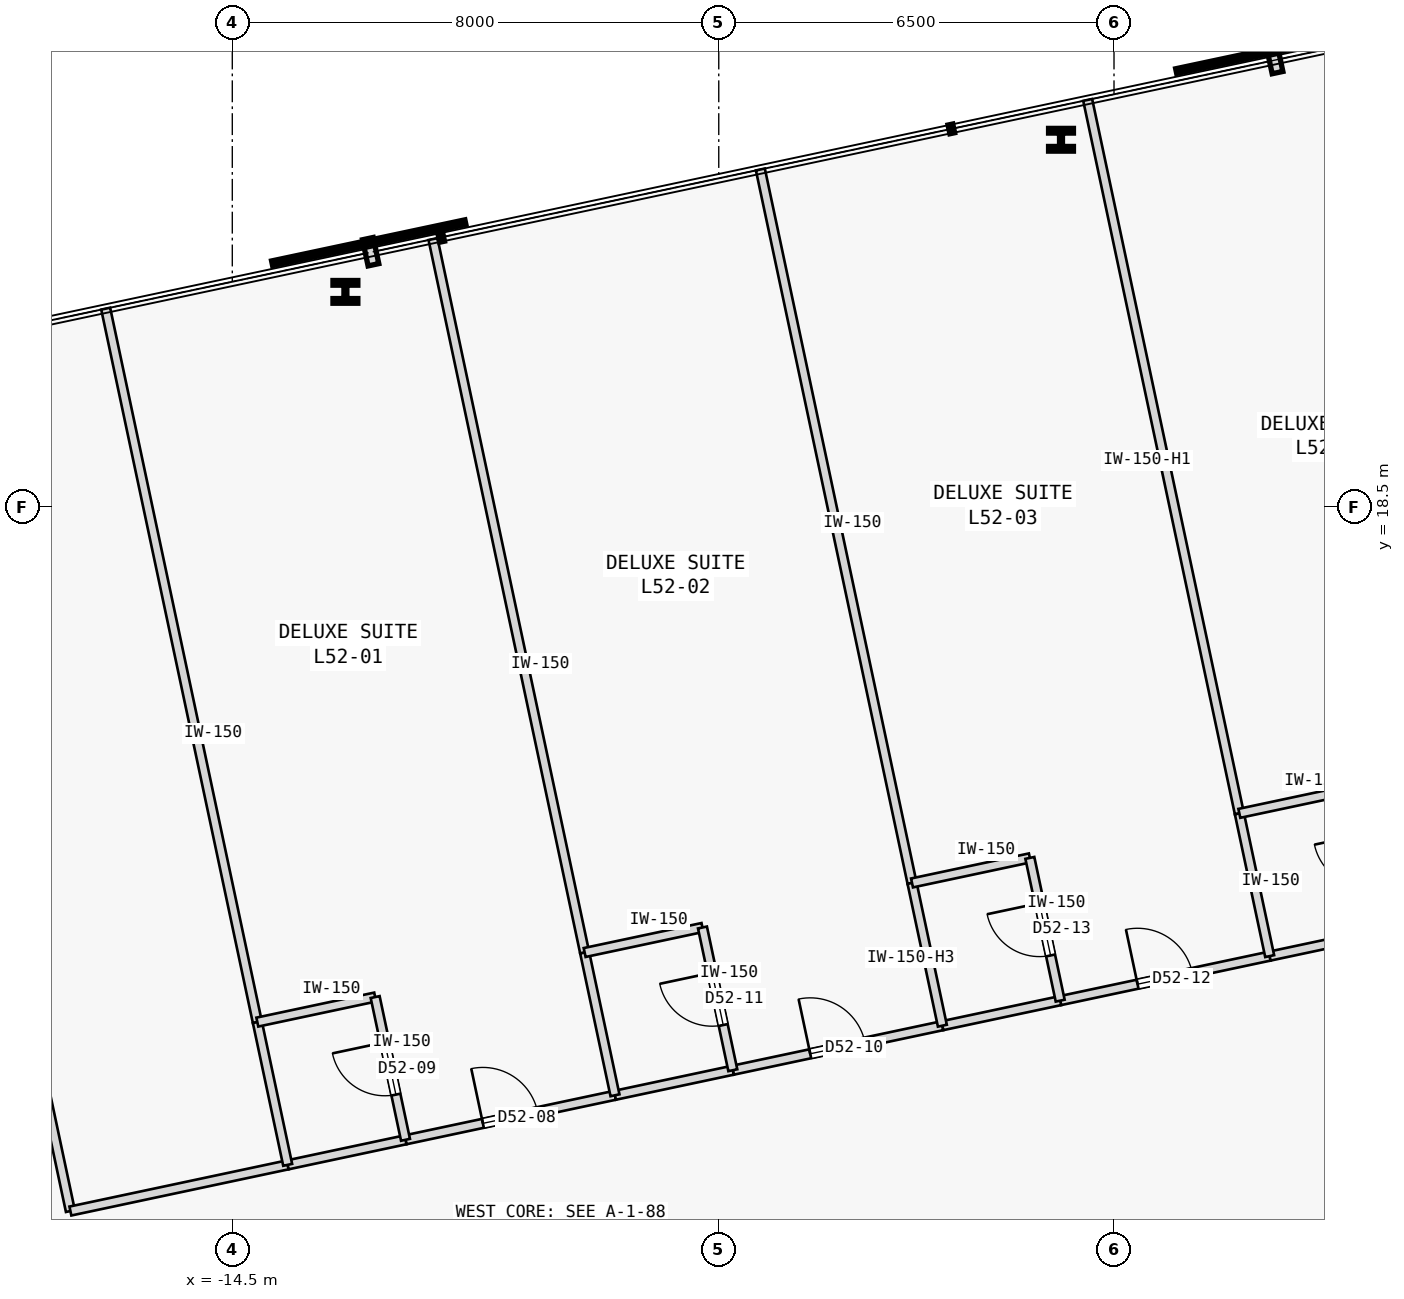
"""IFC4 building model, lengths in metres.
Left out: names, types, materials, properties, quantities, classifications, styles, units other than length and angle.
Written with IfcOpenShell. Run it as: python <this file> out.ifc"""

import sys

from ifc_helpers import new_model, si_unit, direction, frame, frame_2d, origin, origin_2d, place, context, subcontext, project, spatial, rectangle, i_section, extrude, element, fill, save


model = new_model("IFC4")
c1 = context("Model", 3, precision=1e-05, world=origin(), true_north=direction((0.0, 1.0)))
c2 = subcontext(c1, "Body", "Model", "MODEL_VIEW")
j1 = project(units=[si_unit("LENGTHUNIT", "METRE"), si_unit("PLANEANGLEUNIT", "RADIAN")], contexts=[c1])
p1 = place(None, origin())
s1 = spatial("IfcSite", under=j1, at=p1, CompositionType="ELEMENT")
p2 = place(p1, origin())
s2 = spatial("IfcBuilding", under=s1, at=p2, CompositionType="ELEMENT")
p3 = place(p2, frame((0.0, 0.0, 199.0)))
s3 = spatial("IfcBuildingStorey", under=s2, at=p3, CompositionType="ELEMENT", Elevation=199.0)
for number, where, z_axis, x_axis in (
    (1, (-0.872, 24.543, 0.0), (0.0, 0.0, 1.0), (1.0, 0.0, 0.0)),
    (2, (-12.64, 22.042, 0.0), (0.0, 0.0, 1.0), (1.0, 0.0, 0.0)),
):
    element("IfcColumn", number, at=place(p3, frame(where, z_axis=z_axis, x_axis=x_axis)), inside=s3, PredefinedType="COLUMN", context=c2, shape_type="SweptSolid", body=[
        extrude(i_section(OverallWidth=0.409, OverallDepth=0.374, WebThickness=0.048, FlangeThickness=0.077, FilletRadius=0.015, at=origin_2d()), origin(), (0.0, 0.0, 1.0), 3.4),
    ])
p4 = place(p3, frame((-17.162, 6.926, 0.0), z_axis=(0.0, 0.0, 1.0), x_axis=(-0.207911421929, 0.978147657888, 0.0)))
e3 = element("IfcWall", 3, at=p4, inside=s3, PredefinedType="PARTITIONING", context=c2, shape_type="SweptSolid", body=[
    extrude(rectangle(XDim=13.195, YDim=0.15, at=frame_2d((6.598, 0.0))), origin(), (0.0, 0.0, 1.0), 3.0),
])
p5 = place(p4, frame((6.137, 0.0, 0.0)))
e4 = element("IfcOpeningElement", 4, at=p5, cuts=e3, PredefinedType="OPENING", context=c2, shape_type="SweptSolid", body=[
    extrude(rectangle(XDim=0.92, YDim=2.15, at=frame_2d((0.46, 1.075))), frame((0.0, 0.085, 0.0), z_axis=(0.0, -1.0, 0.0), x_axis=(1.0, 0.0, 0.0)), (0.0, 0.0, 1.0), 0.17),
])
p6 = place(p3, frame((-17.162, 6.926, 0.0), z_axis=(0.0, 0.0, 1.0), x_axis=(0.978147299501, 0.207913108004, 0.0)))
e5 = element("IfcWall", 5, at=p6, inside=s3, PredefinedType="PARTITIONING", context=c2, shape_type="SweptSolid", body=[
    extrude(rectangle(XDim=3.653, YDim=0.15, at=frame_2d((1.827, 0.0))), origin(), (0.0, 0.0, 1.0), 3.0),
])
p7 = place(p3, frame((-11.652, 8.097, 0.0), z_axis=(0.0, 0.0, 1.0), x_axis=(0.978153036861, 0.207886114205, 0.0)))
e6 = element("IfcWall", 6, at=p7, inside=s3, PredefinedType="PARTITIONING", context=c2, shape_type="SweptSolid", body=[
    extrude(rectangle(XDim=3.522, YDim=0.15, at=frame_2d((1.761, 0.0))), origin(), (0.0, 0.0, 1.0), 3.0),
])
p8 = place(p7, frame((1.301, 0.0, 0.0)))
e7 = element("IfcOpeningElement", 7, at=p8, cuts=e6, PredefinedType="OPENING", context=c2, shape_type="SweptSolid", body=[
    extrude(rectangle(XDim=0.92, YDim=2.15, at=frame_2d((0.46, 1.075))), frame((0.0, 0.085, 0.0), z_axis=(0.0, -1.0, 0.0), x_axis=(1.0, 0.0, 0.0)), (0.0, 0.0, 1.0), 0.17),
])
p9 = place(p3, frame((-13.589, 7.685, 0.0), z_axis=(0.0, 0.0, 1.0), x_axis=(0.97811873796, 0.208047433175, 0.0)))
e8 = element("IfcWall", 8, at=p9, inside=s3, PredefinedType="PARTITIONING", context=c2, shape_type="SweptSolid", body=[
    extrude(rectangle(XDim=1.981, YDim=0.15, at=frame_2d((0.99, 0.0))), origin(), (0.0, 0.0, 1.0), 3.0),
])
p10 = place(p3, frame((-6.269, 9.241, 0.0), z_axis=(0.0, 0.0, 1.0), x_axis=(0.978150924733, 0.207896052016, 0.0)))
e9 = element("IfcWall", 9, at=p10, inside=s3, PredefinedType="PARTITIONING", context=c2, shape_type="SweptSolid", body=[
    extrude(rectangle(XDim=3.523, YDim=0.15, at=frame_2d((1.761, 0.0))), origin(), (0.0, 0.0, 1.0), 3.0),
])
p11 = place(p10, frame((1.302, 0.0, 0.0)))
e10 = element("IfcOpeningElement", 10, at=p11, cuts=e9, PredefinedType="OPENING", context=c2, shape_type="SweptSolid", body=[
    extrude(rectangle(XDim=0.92, YDim=2.15, at=frame_2d((0.46, 1.075))), frame((0.0, 0.085, 0.0), z_axis=(0.0, -1.0, 0.0), x_axis=(1.0, 0.0, 0.0)), (0.0, 0.0, 1.0), 0.17),
])
p12 = place(p3, frame((-8.207, 8.83, 0.0), z_axis=(0.0, 0.0, 1.0), x_axis=(0.978149140323, 0.20790444749, 0.0)))
e11 = element("IfcWall", 11, at=p12, inside=s3, PredefinedType="PARTITIONING", context=c2, shape_type="SweptSolid", body=[
    extrude(rectangle(XDim=1.981, YDim=0.15, at=frame_2d((0.99, 0.0))), origin(), (0.0, 0.0, 1.0), 3.0),
])
p13 = place(p3, frame((-0.885, 10.386, 0.0), z_axis=(0.0, 0.0, 1.0), x_axis=(0.978153036861, 0.207886114205, 0.0)))
e12 = element("IfcWall", 12, at=p13, inside=s3, PredefinedType="PARTITIONING", context=c2, shape_type="SweptSolid", body=[
    extrude(rectangle(XDim=3.522, YDim=0.15, at=frame_2d((1.761, 0.0))), origin(), (0.0, 0.0, 1.0), 3.0),
])
p14 = place(p13, frame((1.301, 0.0, 0.0)))
e13 = element("IfcOpeningElement", 13, at=p14, cuts=e12, PredefinedType="OPENING", context=c2, shape_type="SweptSolid", body=[
    extrude(rectangle(XDim=0.92, YDim=2.15, at=frame_2d((0.46, 1.075))), frame((0.0, 0.085, 0.0), z_axis=(0.0, -1.0, 0.0), x_axis=(1.0, 0.0, 0.0)), (0.0, 0.0, 1.0), 0.17),
])
for number, where, z_axis, x_axis in (
    (14, (-2.823, 9.974, 0.0), (0.0, 0.0, 1.0), (0.978, 0.208, 0.0)),
    (15, (2.56, 11.118, 0.0), (0.0, 0.0, 1.0), (0.978, 0.208, 0.0)),
):
    element("IfcWall", number, at=place(p3, frame(where, z_axis=z_axis, x_axis=x_axis)), inside=s3, PredefinedType="PARTITIONING", context=c2, shape_type="SweptSolid", body=[
        extrude(rectangle(XDim=1.981, YDim=0.15, at=frame_2d((0.99, 0.0))), origin(), (0.0, 0.0, 1.0), 3.0),
    ])
p15 = place(p3, frame((-14.088, 10.033, 0.0), z_axis=(0.0, 0.0, 1.0), x_axis=(-0.207910848762, 0.978147779718, 0.0)))
e16 = element("IfcWall", 16, at=p15, inside=s3, PredefinedType="PARTITIONING", context=c2, shape_type="SweptSolid", body=[
    extrude(rectangle(XDim=11.995, YDim=0.15, at=frame_2d((5.998, 0.0))), origin(), (0.0, 0.0, 1.0), 3.0),
])
p16 = place(p3, frame((-13.589, 7.685, 0.0), z_axis=(0.0, 0.0, 1.0), x_axis=(-0.207917150959, 0.978146440129, 0.0)))
e17 = element("IfcWall", 17, at=p16, inside=s3, PredefinedType="PARTITIONING", context=c2, shape_type="SweptSolid", body=[
    extrude(rectangle(XDim=2.4, YDim=0.15, at=frame_2d((1.2, 0.0))), origin(), (0.0, 0.0, 1.0), 3.0),
])
p17 = place(p3, frame((-14.088, 10.033, 0.0), z_axis=(0.0, 0.0, 1.0), x_axis=(0.978149140323, 0.20790444749, 0.0)))
e18 = element("IfcWall", 18, at=p17, inside=s3, PredefinedType="PARTITIONING", context=c2, shape_type="SweptSolid", body=[
    extrude(rectangle(XDim=1.981, YDim=0.15, at=frame_2d((0.99, 0.0))), origin(), (0.0, 0.0, 1.0), 3.0),
])
p18 = place(p3, frame((-11.652, 8.097, 0.0), z_axis=(0.0, 0.0, 1.0), x_axis=(-0.207840504985, 0.978162729042, 0.0)))
e19 = element("IfcWall", 19, at=p18, inside=s3, PredefinedType="PARTITIONING", context=c2, shape_type="SweptSolid", body=[
    extrude(rectangle(XDim=2.4, YDim=0.15, at=frame_2d((1.2, 0.0))), origin(), (0.0, 0.0, 1.0), 3.0),
])
p19 = place(p18, frame((0.76, 0.0, 0.0)))
e20 = element("IfcOpeningElement", 20, at=p19, cuts=e19, PredefinedType="OPENING", context=c2, shape_type="SweptSolid", body=[
    extrude(rectangle(XDim=0.88, YDim=2.15, at=frame_2d((0.44, 1.075))), frame((0.0, 0.085, 0.0), z_axis=(0.0, -1.0, 0.0), x_axis=(1.0, 0.0, 0.0)), (0.0, 0.0, 1.0), 0.17),
])
p20 = place(p3, frame((-8.706, 11.177, 0.0), z_axis=(0.0, 0.0, 1.0), x_axis=(-0.207910848762, 0.978147779718, 0.0)))
e21 = element("IfcWall", 21, at=p20, inside=s3, PredefinedType="PARTITIONING", context=c2, shape_type="SweptSolid", body=[
    extrude(rectangle(XDim=11.995, YDim=0.15, at=frame_2d((5.998, 0.0))), origin(), (0.0, 0.0, 1.0), 3.0),
])
p21 = place(p3, frame((-8.207, 8.83, 0.0), z_axis=(0.0, 0.0, 1.0), x_axis=(-0.207937840262, 0.978142042133, 0.0)))
e22 = element("IfcWall", 22, at=p21, inside=s3, PredefinedType="PARTITIONING", context=c2, shape_type="SweptSolid", body=[
    extrude(rectangle(XDim=2.4, YDim=0.15, at=frame_2d((1.2, 0.0))), origin(), (0.0, 0.0, 1.0), 3.0),
])
p22 = place(p3, frame((-8.706, 11.177, 0.0), z_axis=(0.0, 0.0, 1.0), x_axis=(0.978149140323, 0.20790444749, 0.0)))
e23 = element("IfcWall", 23, at=p22, inside=s3, PredefinedType="PARTITIONING", context=c2, shape_type="SweptSolid", body=[
    extrude(rectangle(XDim=1.981, YDim=0.15, at=frame_2d((0.99, 0.0))), origin(), (0.0, 0.0, 1.0), 3.0),
])
p23 = place(p3, frame((-6.269, 9.241, 0.0), z_axis=(0.0, 0.0, 1.0), x_axis=(-0.207937840262, 0.978142042133, 0.0)))
e24 = element("IfcWall", 24, at=p23, inside=s3, PredefinedType="PARTITIONING", context=c2, shape_type="SweptSolid", body=[
    extrude(rectangle(XDim=2.4, YDim=0.15, at=frame_2d((1.2, 0.0))), origin(), (0.0, 0.0, 1.0), 3.0),
])
p24 = place(p23, frame((0.76, 0.0, 0.0)))
e25 = element("IfcOpeningElement", 25, at=p24, cuts=e24, PredefinedType="OPENING", context=c2, shape_type="SweptSolid", body=[
    extrude(rectangle(XDim=0.88, YDim=2.15, at=frame_2d((0.44, 1.075))), frame((0.0, 0.085, 0.0), z_axis=(0.0, -1.0, 0.0), x_axis=(1.0, 0.0, 0.0)), (0.0, 0.0, 1.0), 0.17),
])
p25 = place(p3, frame((-3.322, 12.321, 0.0), z_axis=(0.0, 0.0, 1.0), x_axis=(-0.207910848762, 0.978147779718, 0.0)))
e26 = element("IfcWall", 26, at=p25, inside=s3, PredefinedType="PARTITIONING", context=c2, shape_type="SweptSolid", body=[
    extrude(rectangle(XDim=11.995, YDim=0.15, at=frame_2d((5.998, 0.0))), origin(), (0.0, 0.0, 1.0), 3.0),
])
p26 = place(p3, frame((-2.823, 9.974, 0.0), z_axis=(0.0, 0.0, 1.0), x_axis=(-0.207937840262, 0.978142042133, 0.0)))
e27 = element("IfcWall", 27, at=p26, inside=s3, PredefinedType="PARTITIONING", context=c2, shape_type="SweptSolid", body=[
    extrude(rectangle(XDim=2.4, YDim=0.15, at=frame_2d((1.2, 0.0))), origin(), (0.0, 0.0, 1.0), 2.22),
])
p27 = place(p3, frame((-3.322, 12.321, 0.0), z_axis=(0.0, 0.0, 1.0), x_axis=(0.978124071753, 0.208022355187, 0.0)))
e28 = element("IfcWall", 28, at=p27, inside=s3, PredefinedType="PARTITIONING", context=c2, shape_type="SweptSolid", body=[
    extrude(rectangle(XDim=1.981, YDim=0.15, at=frame_2d((0.991, 0.0))), origin(), (0.0, 0.0, 1.0), 3.0),
])
p28 = place(p3, frame((-0.885, 10.386, 0.0), z_axis=(0.0, 0.0, 1.0), x_axis=(-0.207917150959, 0.978146440129, 0.0)))
e29 = element("IfcWall", 29, at=p28, inside=s3, PredefinedType="PARTITIONING", context=c2, shape_type="SweptSolid", body=[
    extrude(rectangle(XDim=2.4, YDim=0.15, at=frame_2d((1.2, 0.0))), origin(), (0.0, 0.0, 1.0), 3.0),
])
p29 = place(p28, frame((0.76, 0.0, 0.0)))
e30 = element("IfcOpeningElement", 30, at=p29, cuts=e29, PredefinedType="OPENING", context=c2, shape_type="SweptSolid", body=[
    extrude(rectangle(XDim=0.88, YDim=2.15, at=frame_2d((0.44, 1.075))), frame((0.0, 0.085, 0.0), z_axis=(0.0, -1.0, 0.0), x_axis=(1.0, 0.0, 0.0)), (0.0, 0.0, 1.0), 0.17),
])
p30 = place(p3, frame((2.061, 13.466, 0.0), z_axis=(0.0, 0.0, 1.0), x_axis=(-0.207910848762, 0.978147779718, 0.0)))
e31 = element("IfcWall", 31, at=p30, inside=s3, PredefinedType="PARTITIONING", context=c2, shape_type="SweptSolid", body=[
    extrude(rectangle(XDim=11.995, YDim=0.15, at=frame_2d((5.998, 0.0))), origin(), (0.0, 0.0, 1.0), 2.55),
])
p31 = place(p3, frame((2.56, 11.118, 0.0), z_axis=(0.0, 0.0, 1.0), x_axis=(-0.207917150959, 0.978146440129, 0.0)))
e32 = element("IfcWall", 32, at=p31, inside=s3, PredefinedType="PARTITIONING", context=c2, shape_type="SweptSolid", body=[
    extrude(rectangle(XDim=2.4, YDim=0.15, at=frame_2d((1.2, 0.0))), origin(), (0.0, 0.0, 1.0), 3.0),
])
p32 = place(p3, frame((2.061, 13.466, 0.0), z_axis=(0.0, 0.0, 1.0), x_axis=(0.978149140323, 0.20790444749, 0.0)))
e33 = element("IfcWall", 33, at=p32, inside=s3, PredefinedType="PARTITIONING", context=c2, shape_type="SweptSolid", body=[
    extrude(rectangle(XDim=1.981, YDim=0.15, at=frame_2d((0.99, 0.0))), origin(), (0.0, 0.0, 1.0), 3.0),
])
p33 = place(p8, origin())
e34 = element("IfcDoor", 34, at=p33, inside=s3, OperationType="SINGLE_SWING_LEFT", PredefinedType="DOOR", context=c2, shape_type="SweptSolid", body=[
    extrude(rectangle(XDim=0.92, YDim=2.15, at=frame_2d((0.46, 1.075))), frame((0.0, 0.025, 0.0), z_axis=(0.0, -1.0, 0.0), x_axis=(1.0, 0.0, 0.0)), (0.0, 0.0, 1.0), 0.05),
])
fill(e7, e34)
p34 = place(p19, origin())
e35 = element("IfcDoor", 35, at=p34, inside=s3, OperationType="SINGLE_SWING_RIGHT", PredefinedType="DOOR", context=c2, shape_type="SweptSolid", body=[
    extrude(rectangle(XDim=0.88, YDim=2.15, at=frame_2d((0.44, 1.075))), frame((0.0, 0.025, 0.0), z_axis=(0.0, -1.0, 0.0), x_axis=(1.0, 0.0, 0.0)), (0.0, 0.0, 1.0), 0.05),
])
fill(e20, e35)
p35 = place(p11, origin())
e36 = element("IfcDoor", 36, at=p35, inside=s3, OperationType="SINGLE_SWING_LEFT", PredefinedType="DOOR", context=c2, shape_type="SweptSolid", body=[
    extrude(rectangle(XDim=0.92, YDim=2.15, at=frame_2d((0.46, 1.075))), frame((0.0, 0.025, 0.0), z_axis=(0.0, -1.0, 0.0), x_axis=(1.0, 0.0, 0.0)), (0.0, 0.0, 1.0), 0.05),
])
fill(e10, e36)
p36 = place(p24, origin())
e37 = element("IfcDoor", 37, at=p36, inside=s3, OperationType="SINGLE_SWING_RIGHT", PredefinedType="DOOR", context=c2, shape_type="SweptSolid", body=[
    extrude(rectangle(XDim=0.88, YDim=2.15, at=frame_2d((0.44, 1.075))), frame((0.0, 0.025, 0.0), z_axis=(0.0, -1.0, 0.0), x_axis=(1.0, 0.0, 0.0)), (0.0, 0.0, 1.0), 0.05),
])
fill(e25, e37)
p37 = place(p14, origin())
e38 = element("IfcDoor", 38, at=p37, inside=s3, OperationType="SINGLE_SWING_LEFT", PredefinedType="DOOR", context=c2, shape_type="SweptSolid", body=[
    extrude(rectangle(XDim=0.92, YDim=2.15, at=frame_2d((0.46, 1.075))), frame((0.0, 0.025, 0.0), z_axis=(0.0, -1.0, 0.0), x_axis=(1.0, 0.0, 0.0)), (0.0, 0.0, 1.0), 0.05),
])
fill(e13, e38)
p38 = place(p29, origin())
e39 = element("IfcDoor", 39, at=p38, inside=s3, OperationType="SINGLE_SWING_RIGHT", PredefinedType="DOOR", context=c2, shape_type="SweptSolid", body=[
    extrude(rectangle(XDim=0.88, YDim=2.15, at=frame_2d((0.44, 1.075))), frame((0.0, 0.025, 0.0), z_axis=(0.0, -1.0, 0.0), x_axis=(1.0, 0.0, 0.0)), (0.0, 0.0, 1.0), 0.05),
])
fill(e30, e39)
save(model, sys.argv[1])
